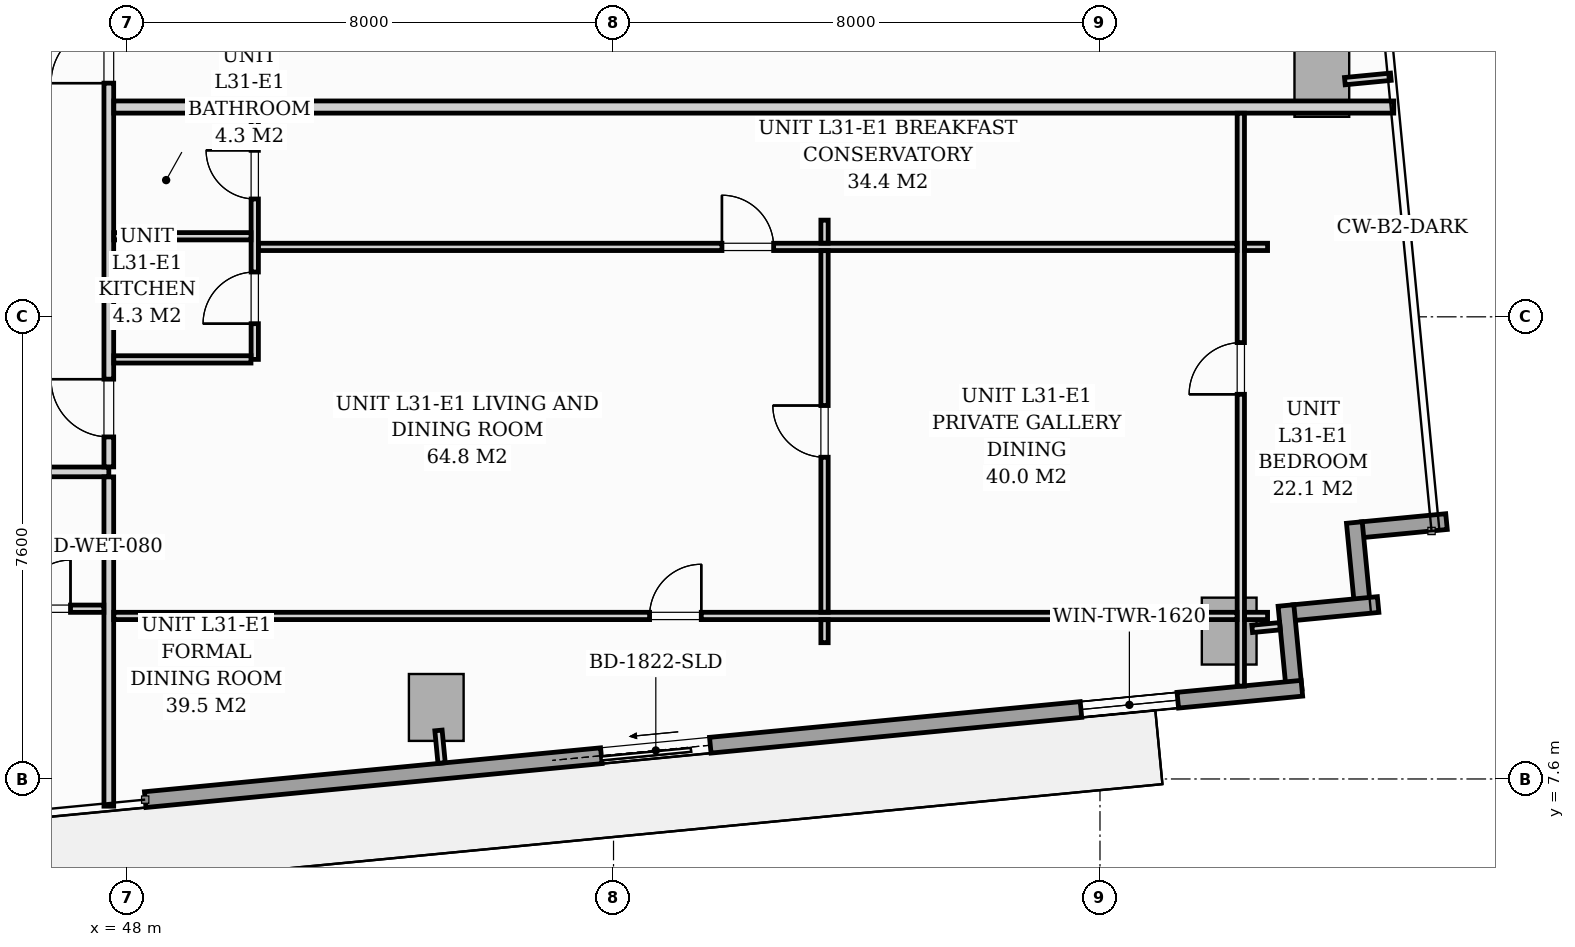
"""IFC4 building model, lengths in metres.
Left out: names, types, materials, properties, quantities, classifications, styles, units other than length and angle.
Written with IfcOpenShell. Run it as: python <this file> out.ifc"""

import sys

from ifc_helpers import new_model, si_unit, direction, frame, frame_2d, origin, origin_2d, place, context, subcontext, project, spatial, rectangle, extrude, source, transform, mapped, element, fill, save


model = new_model("IFC4")
c1 = context("Model", 3, precision=1e-05, world=origin(), true_north=direction((0.0, 1.0)))
c2 = subcontext(c1, "Body", "Model", "MODEL_VIEW")
j1 = project(units=[si_unit("LENGTHUNIT", "METRE"), si_unit("PLANEANGLEUNIT", "RADIAN")], contexts=[c1])
p1 = place(None, origin())
s1 = spatial("IfcSite", under=j1, at=p1, CompositionType="ELEMENT")
p2 = place(p1, origin())
s2 = spatial("IfcBuilding", under=s1, at=p2, CompositionType="ELEMENT")
p3 = place(p2, frame((0.0, 0.0, 109.8)))
s3 = spatial("IfcBuildingStorey", under=s2, at=p3, CompositionType="ELEMENT", Elevation=109.8)
m1 = source(origin(), c2, "Body", "SweptSolid", [
    extrude(rectangle(XDim=0.9, YDim=1.1, at=origin_2d()), origin(), (0.0, 0.0, 1.0), 3.196),
])
for number, where, z_axis, x_axis in (
    (1, (53.085, 8.776, 0.002), (0.0, 0.0, 1.0), (0.995, 0.096, 0.0)),
    (2, (66.125, 10.032, 0.002), (0.0, 0.0, 1.0), (0.995, 0.096, 0.0)),
    (3, (67.648, 19.039, 0.002), (0.0, 0.0, 1.0), (0.995, 0.096, 0.0)),
):
    element("IfcColumn", number, at=place(p3, frame(where, z_axis=z_axis, x_axis=x_axis)), inside=s3, PredefinedType="COLUMN", context=c2, shape_type="MappedRepresentation", body=[
        mapped(m1, transform((0.0, 0.0, 0.0), scale=1.0)),
    ])
for number, where, z_axis, x_axis in (
    (4, (69.698, 11.833, 0.0), (0.0, 0.0, 1.0), (-0.995, -0.096, 0.0)),
    (5, (68.183, 11.817, 0.0), (0.0, 0.0, 1.0), (0.096, -0.995, 0.0)),
):
    element("IfcWall", number, at=place(p3, frame(where, z_axis=z_axis, x_axis=x_axis)), inside=s3, PredefinedType="STANDARD", context=c2, shape_type="SweptSolid", body=[
        extrude(rectangle(XDim=1.395, YDim=0.26, at=frame_2d((0.697, 0.0))), origin(), (0.0, 0.0, 1.0), 2.94),
    ])
p4 = place(p3, frame((68.574, 10.469, 0.0), z_axis=(0.0, 0.0, 1.0), x_axis=(-0.99540774648, -0.095725744959, 0.0)))
e6 = element("IfcWall", 6, at=p4, inside=s3, PredefinedType="STANDARD", context=c2, shape_type="SweptSolid", body=[
    extrude(rectangle(XDim=1.395, YDim=0.26, at=frame_2d((0.698, 0.0))), origin(), (0.0, 0.0, 1.0), 2.94),
])
p5 = place(p3, frame((67.059, 10.453, 0.0), z_axis=(0.0, 0.0, 1.0), x_axis=(0.095915846097, -0.995389446633, 0.0)))
e7 = element("IfcWall", 7, at=p5, inside=s3, PredefinedType="STANDARD", context=c2, shape_type="SweptSolid", body=[
    extrude(rectangle(XDim=1.395, YDim=0.26, at=frame_2d((0.697, 0.0))), origin(), (0.0, 0.0, 1.0), 2.94),
])
p6 = place(p3, frame((67.32, 9.092, 0.0), z_axis=(0.0, 0.0, 1.0), x_axis=(-0.995396521236, -0.095842399342, 0.0)))
e8 = element("IfcWall", 8, at=p6, inside=s3, PredefinedType="STANDARD", context=c2, shape_type="SweptSolid", body=[
    extrude(rectangle(XDim=19.11, YDim=0.26, at=frame_2d((9.555, 0.0))), origin(), (0.0, 0.0, 1.0), 2.94),
])
p7 = place(p6, frame((9.774, 0.0, 0.0)))
e9 = element("IfcOpeningElement", 9, at=p7, cuts=e8, PredefinedType="OPENING", context=c2, shape_type="SweptSolid", body=[
    extrude(rectangle(XDim=1.8, YDim=2.06, at=frame_2d((0.9, 1.03))), frame((0.0, 0.14, 0.0), z_axis=(0.0, -1.0, 0.0), x_axis=(1.0, 0.0, 0.0)), (0.0, 0.0, 1.0), 0.28),
])
p8 = place(p6, frame((2.05, 0.0, 0.65)))
e10 = element("IfcOpeningElement", 10, at=p8, cuts=e8, PredefinedType="OPENING", context=c2, shape_type="SweptSolid", body=[
    extrude(rectangle(XDim=1.6, YDim=1.5, at=frame_2d((0.8, 0.75))), frame((0.0, 0.14, 0.0), z_axis=(0.0, -1.0, 0.0), x_axis=(1.0, 0.0, 0.0)), (0.0, 0.0, 1.0), 0.28),
])
p9 = place(p3, frame((21.5, 12.65, 0.0), z_axis=(0.0, 0.0, 1.0), x_axis=(1.0, 0.0, 0.0)))
e11 = element("IfcWall", 11, at=p9, inside=s3, PredefinedType="PARTITIONING", context=c2, shape_type="SweptSolid", body=[
    extrude(rectangle(XDim=26.2, YDim=0.16, at=frame_2d((13.1, 0.0))), origin(), (0.0, 0.0, 1.0), 2.94),
])
p10 = place(p9, frame((5.927, 0.0, 0.0)))
e12 = element("IfcOpeningElement", 12, at=p10, cuts=e11, PredefinedType="OPENING", context=c2, shape_type="SweptSolid", body=[
    extrude(rectangle(XDim=0.95, YDim=2.06, at=frame_2d((0.475, 1.03))), frame((0.0, 0.09, 0.0), z_axis=(0.0, -1.0, 0.0), x_axis=(1.0, 0.0, 0.0)), (0.0, 0.0, 1.0), 0.18),
])
p11 = place(p9, frame((10.575, 0.0, 0.0)))
e13 = element("IfcOpeningElement", 13, at=p11, cuts=e11, PredefinedType="OPENING", context=c2, shape_type="SweptSolid", body=[
    extrude(rectangle(XDim=0.95, YDim=2.06, at=frame_2d((0.475, 1.03))), frame((0.0, 0.09, 0.0), z_axis=(0.0, -1.0, 0.0), x_axis=(1.0, 0.0, 0.0)), (0.0, 0.0, 1.0), 0.18),
])
p12 = place(p9, frame((19.322, 0.0, 0.0)))
e14 = element("IfcOpeningElement", 14, at=p12, cuts=e11, PredefinedType="OPENING", context=c2, shape_type="SweptSolid", body=[
    extrude(rectangle(XDim=0.95, YDim=2.06, at=frame_2d((0.475, 1.03))), frame((0.0, 0.09, 0.0), z_axis=(0.0, -1.0, 0.0), x_axis=(1.0, 0.0, 0.0)), (0.0, 0.0, 1.0), 0.18),
])
p13 = place(p3, frame((47.7, 7.153, 0.0), z_axis=(0.0, 0.0, 1.0), x_axis=(0.0, 1.0, 0.0)))
e15 = element("IfcWall", 15, at=p13, inside=s3, PredefinedType="PARTITIONING", context=c2, shape_type="SweptSolid", body=[
    extrude(rectangle(XDim=5.416, YDim=0.16, at=frame_2d((2.708, 0.0))), origin(), (0.0, 0.0, 1.0), 2.94),
])
p14 = place(p3, frame((47.7, 12.732, 0.0), z_axis=(0.0, 0.0, 1.0), x_axis=(0.0, 1.0, 0.0)))
e16 = element("IfcWall", 16, at=p14, inside=s3, PredefinedType="PARTITIONING", context=c2, shape_type="SweptSolid", body=[
    extrude(rectangle(XDim=7.918, YDim=0.16, at=frame_2d((3.959, 0.0))), origin(), (0.0, 0.0, 1.0), 2.94),
])
p15 = place(p14, frame((0.493, 0.0, 0.0)))
e17 = element("IfcOpeningElement", 17, at=p15, cuts=e16, PredefinedType="OPENING", context=c2, shape_type="SweptSolid", body=[
    extrude(rectangle(XDim=0.95, YDim=2.06, at=frame_2d((0.475, 1.03))), frame((0.0, 0.09, 0.0), z_axis=(0.0, -1.0, 0.0), x_axis=(1.0, 0.0, 0.0)), (0.0, 0.0, 1.0), 0.18),
])
p16 = place(p14, frame((6.311, 0.0, 0.0)))
e18 = element("IfcOpeningElement", 18, at=p16, cuts=e16, PredefinedType="OPENING", context=c2, shape_type="SweptSolid", body=[
    extrude(rectangle(XDim=0.95, YDim=2.06, at=frame_2d((0.475, 1.03))), frame((0.0, 0.09, 0.0), z_axis=(0.0, -1.0, 0.0), x_axis=(1.0, 0.0, 0.0)), (0.0, 0.0, 1.0), 0.18),
])
p17 = place(p3, frame((43.52, 10.4, 0.0), z_axis=(0.0, 0.0, 1.0), x_axis=(1.0, 0.0, 0.0)))
e19 = element("IfcWall", 19, at=p17, inside=s3, PredefinedType="PARTITIONING", context=c2, shape_type="SweptSolid", body=[
    extrude(rectangle(XDim=4.098, YDim=0.12, at=frame_2d((2.049, 0.0))), origin(), (0.0, 0.0, 1.0), 2.94),
])
p18 = place(p17, frame((0.675, 0.0, 0.0)))
e20 = element("IfcOpeningElement", 20, at=p18, cuts=e19, PredefinedType="OPENING", context=c2, shape_type="SweptSolid", body=[
    extrude(rectangle(XDim=0.85, YDim=2.05, at=frame_2d((0.425, 1.025))), frame((0.0, 0.07, 0.0), z_axis=(0.0, -1.0, 0.0), x_axis=(1.0, 0.0, 0.0)), (0.0, 0.0, 1.0), 0.14),
])
p19 = place(p17, frame((2.75, 0.0, 0.0)))
e21 = element("IfcOpeningElement", 21, at=p19, cuts=e19, PredefinedType="OPENING", context=c2, shape_type="SweptSolid", body=[
    extrude(rectangle(XDim=0.8, YDim=2.02, at=frame_2d((0.4, 1.01))), frame((0.0, 0.07, 0.0), z_axis=(0.0, -1.0, 0.0), x_axis=(1.0, 0.0, 0.0)), (0.0, 0.0, 1.0), 0.14),
])
p20 = place(p3, frame((47.782, 18.65, 0.0), z_axis=(0.0, 0.0, 1.0), x_axis=(1.0, 0.0, 0.0)))
e22 = element("IfcWall", 22, at=p20, inside=s3, PredefinedType="PARTITIONING", context=c2, shape_type="SweptSolid", body=[
    extrude(rectangle(XDim=21.049, YDim=0.2, at=frame_2d((10.525, 0.0))), origin(), (0.0, 0.0, 1.0), 2.063),
])
p21 = place(p3, frame((50.1, 14.5, 0.0), z_axis=(0.0, 0.0, 1.0), x_axis=(0.0, 1.0, 0.0)))
e23 = element("IfcWall", 23, at=p21, inside=s3, PredefinedType="PARTITIONING", context=c2, shape_type="SweptSolid", body=[
    extrude(rectangle(XDim=4.048, YDim=0.12, at=frame_2d((2.024, 0.0))), origin(), (0.0, 0.0, 1.0), 2.94),
])
p22 = place(p21, frame((0.587, 0.0, 0.0)))
e24 = element("IfcOpeningElement", 24, at=p22, cuts=e23, PredefinedType="OPENING", context=c2, shape_type="SweptSolid", body=[
    extrude(rectangle(XDim=0.85, YDim=2.05, at=frame_2d((0.425, 1.025))), frame((0.0, 0.07, 0.0), z_axis=(0.0, -1.0, 0.0), x_axis=(1.0, 0.0, 0.0)), (0.0, 0.0, 1.0), 0.14),
])
p23 = place(p21, frame((2.638, 0.0, 0.0)))
e25 = element("IfcOpeningElement", 25, at=p23, cuts=e23, PredefinedType="OPENING", context=c2, shape_type="SweptSolid", body=[
    extrude(rectangle(XDim=0.8, YDim=2.02, at=frame_2d((0.4, 1.01))), frame((0.0, 0.07, 0.0), z_axis=(0.0, -1.0, 0.0), x_axis=(1.0, 0.0, 0.0)), (0.0, 0.0, 1.0), 0.14),
])
for number, where, z_axis, x_axis in (
    (26, (47.782, 16.525, 0.0), (0.0, 0.0, 1.0), (1.0, 0.0, 0.0)),
    (27, (47.782, 14.5, 0.0), (0.0, 0.0, 1.0), (1.0, 0.0, 0.0)),
):
    element("IfcWall", number, at=place(p3, frame(where, z_axis=z_axis, x_axis=x_axis)), inside=s3, PredefinedType="PARTITIONING", context=c2, shape_type="SweptSolid", body=[
        extrude(rectangle(XDim=2.256, YDim=0.12, at=frame_2d((1.128, 0.0))), origin(), (0.0, 0.0, 1.0), 2.94),
    ])
p24 = place(p3, frame((66.316, 9.128, 0.0), z_axis=(0.0, 0.0, 1.0), x_axis=(0.0, 1.0, 0.0)))
e28 = element("IfcWall", 28, at=p24, inside=s3, PredefinedType="PARTITIONING", context=c2, shape_type="SweptSolid", body=[
    extrude(rectangle(XDim=9.42, YDim=0.12, at=frame_2d((4.71, 0.0))), origin(), (0.0, 0.0, 1.0), 2.31),
])
p25 = place(p24, frame((4.798, 0.0, 0.0)))
e29 = element("IfcOpeningElement", 29, at=p25, cuts=e28, PredefinedType="OPENING", context=c2, shape_type="SweptSolid", body=[
    extrude(rectangle(XDim=0.85, YDim=2.05, at=frame_2d((0.425, 1.025))), frame((0.0, 0.07, 0.0), z_axis=(0.0, -1.0, 0.0), x_axis=(1.0, 0.0, 0.0)), (0.0, 0.0, 1.0), 0.14),
])
p26 = place(p3, frame((47.782, 10.281, 0.0), z_axis=(0.0, 0.0, 1.0), x_axis=(1.0, 0.0, 0.0)))
e30 = element("IfcWall", 30, at=p26, inside=s3, PredefinedType="PARTITIONING", context=c2, shape_type="SweptSolid", body=[
    extrude(rectangle(XDim=18.472, YDim=0.12, at=frame_2d((9.236, 0.0))), origin(), (0.0, 0.0, 1.0), 2.94),
])
p27 = place(p26, frame((8.811, 0.0, 0.0)))
e31 = element("IfcOpeningElement", 31, at=p27, cuts=e30, PredefinedType="OPENING", context=c2, shape_type="SweptSolid", body=[
    extrude(rectangle(XDim=0.85, YDim=2.05, at=frame_2d((0.425, 1.025))), frame((0.0, 0.07, 0.0), z_axis=(0.0, -1.0, 0.0), x_axis=(1.0, 0.0, 0.0)), (0.0, 0.0, 1.0), 0.14),
])
p28 = place(p3, frame((66.378, 10.281, 0.0), z_axis=(0.0, 0.0, 1.0), x_axis=(1.0, 0.0, 0.0)))
e32 = element("IfcWall", 32, at=p28, inside=s3, PredefinedType="PARTITIONING", context=c2, shape_type="SweptSolid", body=[
    extrude(rectangle(XDim=0.378, YDim=0.12, at=frame_2d((0.189, 0.0))), origin(), (0.0, 0.0, 1.0), 2.94),
])
p29 = place(p3, frame((50.162, 16.35, 0.0), z_axis=(0.0, 0.0, 1.0), x_axis=(1.0, 0.0, 0.0)))
e33 = element("IfcWall", 33, at=p29, inside=s3, PredefinedType="PARTITIONING", context=c2, shape_type="SweptSolid", body=[
    extrude(rectangle(XDim=16.092, YDim=0.12, at=frame_2d((8.046, 0.0))), origin(), (0.0, 0.0, 1.0), 2.94),
])
p30 = place(p29, frame((7.621, 0.0, 0.0)))
e34 = element("IfcOpeningElement", 34, at=p30, cuts=e33, PredefinedType="OPENING", context=c2, shape_type="SweptSolid", body=[
    extrude(rectangle(XDim=0.85, YDim=2.05, at=frame_2d((0.425, 1.025))), frame((0.0, 0.07, 0.0), z_axis=(0.0, -1.0, 0.0), x_axis=(1.0, 0.0, 0.0)), (0.0, 0.0, 1.0), 0.14),
])
p31 = place(p3, frame((66.378, 16.35, 0.0), z_axis=(0.0, 0.0, 1.0), x_axis=(1.0, 0.0, 0.0)))
e35 = element("IfcWall", 35, at=p31, inside=s3, PredefinedType="PARTITIONING", context=c2, shape_type="SweptSolid", body=[
    extrude(rectangle(XDim=0.378, YDim=0.12, at=frame_2d((0.189, 0.0))), origin(), (0.0, 0.0, 1.0), 2.94),
])
p32 = place(p3, frame((59.47, 9.841, 0.0), z_axis=(0.0, 0.0, 1.0), x_axis=(0.0, 1.0, 0.0)))
e36 = element("IfcWall", 36, at=p32, inside=s3, PredefinedType="PARTITIONING", context=c2, shape_type="SweptSolid", body=[
    extrude(rectangle(XDim=0.378, YDim=0.12, at=frame_2d((0.189, 0.0))), origin(), (0.0, 0.0, 1.0), 2.94),
])
p33 = place(p3, frame((59.47, 10.343, 0.0), z_axis=(0.0, 0.0, 1.0), x_axis=(0.0, 1.0, 0.0)))
e37 = element("IfcWall", 37, at=p33, inside=s3, PredefinedType="PARTITIONING", context=c2, shape_type="SweptSolid", body=[
    extrude(rectangle(XDim=5.945, YDim=0.12, at=frame_2d((2.973, 0.0))), origin(), (0.0, 0.0, 1.0), 2.94),
])
p34 = place(p33, frame((2.548, 0.0, 0.0)))
e38 = element("IfcOpeningElement", 38, at=p34, cuts=e37, PredefinedType="OPENING", context=c2, shape_type="SweptSolid", body=[
    extrude(rectangle(XDim=0.85, YDim=2.05, at=frame_2d((0.425, 1.025))), frame((0.0, 0.07, 0.0), z_axis=(0.0, -1.0, 0.0), x_axis=(1.0, 0.0, 0.0)), (0.0, 0.0, 1.0), 0.14),
])
p35 = place(p3, frame((59.47, 16.412, 0.0), z_axis=(0.0, 0.0, 1.0), x_axis=(0.0, 1.0, 0.0)))
e39 = element("IfcWall", 39, at=p35, inside=s3, PredefinedType="PARTITIONING", context=c2, shape_type="SweptSolid", body=[
    extrude(rectangle(XDim=0.378, YDim=0.12, at=frame_2d((0.189, 0.0))), origin(), (0.0, 0.0, 1.0), 2.94),
])
p36 = place(p3, frame((53.121, 8.398, 0.0), z_axis=(0.0, 0.0, 1.0), x_axis=(0.096179204763, -0.995364034196, 0.0)))
e40 = element("IfcWall", 40, at=p36, inside=s3, PredefinedType="PARTITIONING", context=c2, shape_type="SweptSolid", body=[
    extrude(rectangle(XDim=0.538, YDim=0.12, at=frame_2d((0.269, 0.0))), origin(), (0.0, 0.0, 1.0), 2.94),
])
p37 = place(p3, frame((66.503, 10.068, 0.0), z_axis=(0.0, 0.0, 1.0), x_axis=(0.995389482415, 0.095915474751, 0.0)))
e41 = element("IfcWall", 41, at=p37, inside=s3, PredefinedType="PARTITIONING", context=c2, shape_type="SweptSolid", body=[
    extrude(rectangle(XDim=0.458, YDim=0.12, at=frame_2d((0.229, 0.0))), origin(), (0.0, 0.0, 1.0), 2.94),
])
p38 = place(p3, frame((68.027, 19.076, 0.0), z_axis=(0.0, 0.0, 1.0), x_axis=(0.995377786728, 0.096036772582, 0.0)))
e42 = element("IfcWall", 42, at=p38, inside=s3, PredefinedType="PARTITIONING", context=c2, shape_type="SweptSolid", body=[
    extrude(rectangle(XDim=0.76, YDim=0.12, at=frame_2d((0.38, 0.0))), origin(), (0.0, 0.0, 1.0), 2.94),
])
m2 = source(origin(), c2, "Body", "SweptSolid", [
    extrude(rectangle(XDim=1.8, YDim=2.06, at=frame_2d((0.9, 1.03))), frame((0.0, 0.025, 0.0), z_axis=(0.0, -1.0, 0.0), x_axis=(1.0, 0.0, 0.0)), (0.0, 0.0, 1.0), 0.05),
])
p39 = place(p7, origin())
e43 = element("IfcDoor", 43, at=p39, inside=s3, OperationType="SLIDING_TO_RIGHT", PredefinedType="DOOR", context=c2, shape_type="MappedRepresentation", body=[
    mapped(m2, transform((0.0, 0.0, 0.0), scale=1.0)),
])
fill(e9, e43)
m3 = source(origin(), c2, "Body", "SweptSolid", [
    extrude(rectangle(XDim=1.6, YDim=1.5, at=frame_2d((0.8, 0.75))), frame((0.0, 0.03, 0.0), z_axis=(0.0, -1.0, 0.0), x_axis=(1.0, 0.0, 0.0)), (0.0, 0.0, 1.0), 0.06),
])
p40 = place(p8, origin())
e44 = element("IfcWindow", 44, at=p40, inside=s3, PartitioningType="SINGLE_PANEL", PredefinedType="WINDOW", context=c2, shape_type="MappedRepresentation", body=[
    mapped(m3, transform((0.0, 0.0, 0.0), scale=1.0)),
])
fill(e10, e44)
m4 = source(origin(), c2, "Body", "SweptSolid", [
    extrude(rectangle(XDim=0.8, YDim=2.02, at=frame_2d((0.4, 1.01))), frame((0.0, 0.025, 0.0), z_axis=(0.0, -1.0, 0.0), x_axis=(1.0, 0.0, 0.0)), (0.0, 0.0, 1.0), 0.05),
])
p41 = place(p19, origin())
e45 = element("IfcDoor", 45, at=p41, inside=s3, OperationType="SINGLE_SWING_RIGHT", PredefinedType="DOOR", context=c2, shape_type="MappedRepresentation", body=[
    mapped(m4, transform((0.0, 0.0, 0.0), scale=1.0)),
])
fill(e21, e45)
m5 = source(origin(), c2, "Body", "SweptSolid", [
    extrude(rectangle(XDim=0.95, YDim=2.06, at=frame_2d((0.475, 1.03))), frame((0.0, 0.025, 0.0), z_axis=(0.0, -1.0, 0.0), x_axis=(1.0, 0.0, 0.0)), (0.0, 0.0, 1.0), 0.05),
])
p42 = place(p15, origin())
e46 = element("IfcDoor", 46, at=p42, inside=s3, OperationType="SINGLE_SWING_RIGHT", PredefinedType="DOOR", context=c2, shape_type="MappedRepresentation", body=[
    mapped(m5, transform((0.0, 0.0, 0.0), scale=1.0)),
])
fill(e17, e46)
m6 = source(origin(), c2, "Body", "SweptSolid", [
    extrude(rectangle(XDim=0.85, YDim=2.05, at=frame_2d((0.425, 1.025))), frame((0.0, 0.025, 0.0), z_axis=(0.0, -1.0, 0.0), x_axis=(1.0, 0.0, 0.0)), (0.0, 0.0, 1.0), 0.05),
])
p43 = place(p22, origin())
e47 = element("IfcDoor", 47, at=p43, inside=s3, OperationType="SINGLE_SWING_LEFT", PredefinedType="DOOR", context=c2, shape_type="MappedRepresentation", body=[
    mapped(m6, transform((0.0, 0.0, 0.0), scale=1.0)),
])
fill(e24, e47)
p44 = place(p23, origin())
e48 = element("IfcDoor", 48, at=p44, inside=s3, OperationType="SINGLE_SWING_RIGHT", PredefinedType="DOOR", context=c2, shape_type="MappedRepresentation", body=[
    mapped(m4, transform((0.0, 0.0, 0.0), scale=1.0)),
])
fill(e25, e48)
p45 = place(p25, origin())
e49 = element("IfcDoor", 49, at=p45, inside=s3, OperationType="SINGLE_SWING_LEFT", PredefinedType="DOOR", context=c2, shape_type="MappedRepresentation", body=[
    mapped(m6, transform((0.0, 0.0, 0.0), scale=1.0)),
])
fill(e29, e49)
p46 = place(p27, origin())
e50 = element("IfcDoor", 50, at=p46, inside=s3, OperationType="SINGLE_SWING_RIGHT", PredefinedType="DOOR", context=c2, shape_type="MappedRepresentation", body=[
    mapped(m6, transform((0.0, 0.0, 0.0), scale=1.0)),
])
fill(e31, e50)
p47 = place(p30, origin())
e51 = element("IfcDoor", 51, at=p47, inside=s3, OperationType="SINGLE_SWING_LEFT", PredefinedType="DOOR", context=c2, shape_type="MappedRepresentation", body=[
    mapped(m6, transform((0.0, 0.0, 0.0), scale=1.0)),
])
fill(e34, e51)
p48 = place(p34, origin())
e52 = element("IfcDoor", 52, at=p48, inside=s3, OperationType="SINGLE_SWING_RIGHT", PredefinedType="DOOR", context=c2, shape_type="MappedRepresentation", body=[
    mapped(m6, transform((0.0, 0.0, 0.0), scale=1.0)),
])
fill(e38, e52)
p49 = place(p16, origin())
e53 = element("IfcDoor", 53, at=p49, inside=s3, OperationType="SINGLE_SWING_LEFT", PredefinedType="DOOR", context=c2, shape_type="MappedRepresentation", body=[
    mapped(m5, transform((0.0, 0.0, 0.0), scale=1.0)),
])
fill(e18, e53)
save(model, sys.argv[1])
